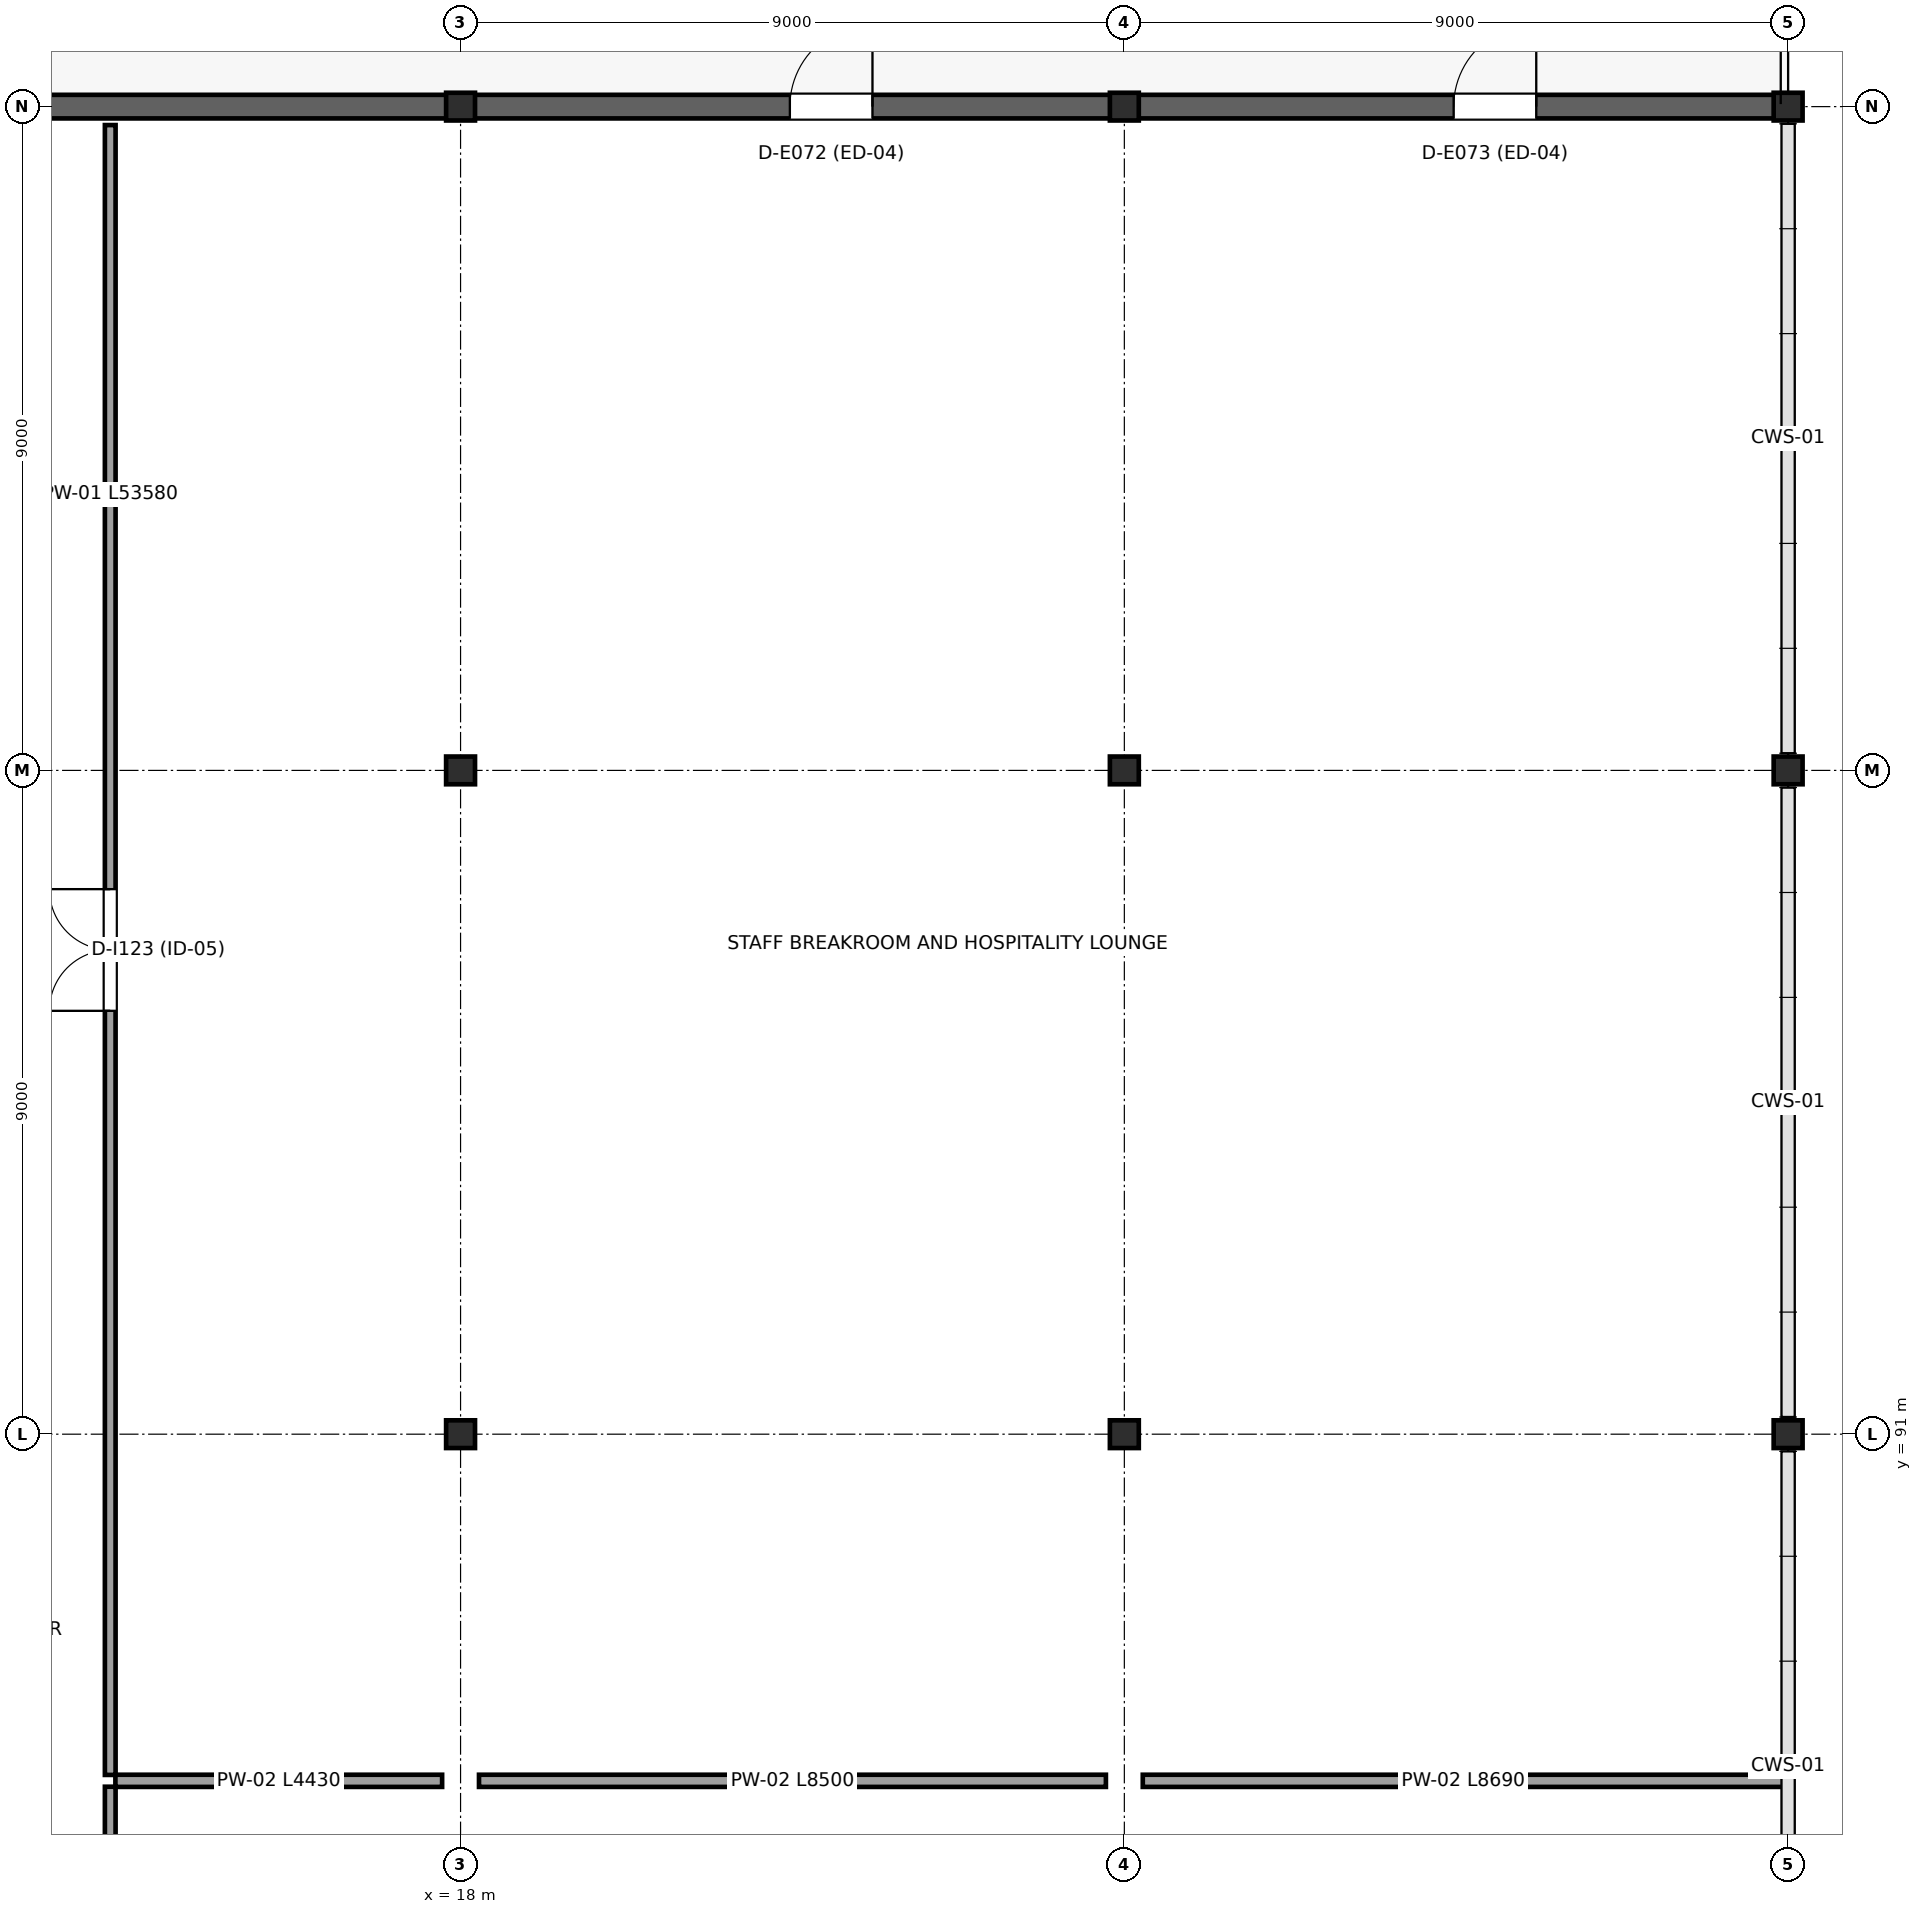
"""IFC4 building model, lengths in metres.
Left out: names, types, materials, properties, quantities, classifications, styles, units other than length and angle.
Written with IfcOpenShell. Run it as: python <this file> out.ifc"""

import sys

from ifc_helpers import new_model, si_unit, direction, frame, frame_2d, origin, origin_2d, place, context, subcontext, project, spatial, rectangle, i_section, extrude, element, fill, save


model = new_model("IFC4")
c1 = context("Model", 3, precision=1e-05, world=origin(), true_north=direction((0.0, 1.0)))
c2 = subcontext(c1, "Body", "Model", "MODEL_VIEW")
j1 = project(units=[si_unit("LENGTHUNIT", "METRE"), si_unit("PLANEANGLEUNIT", "RADIAN")], contexts=[c1])
p1 = place(None, origin())
s1 = spatial("IfcSite", under=j1, at=p1, CompositionType="ELEMENT")
p2 = place(p1, origin())
s2 = spatial("IfcBuilding", under=s1, at=p2, CompositionType="ELEMENT")
p3 = place(p2, frame((0.0, 0.0, 16.5)))
s3 = spatial("IfcBuildingStorey", under=s2, at=p3, CompositionType="ELEMENT", Elevation=16.5)
for number, where, z_axis, x_axis in (
    (1, (18.0, 91.0, 0.0), (0.0, 0.0, 1.0), (1.0, 0.0, 0.0)),
    (2, (18.0, 100.0, 0.0), (0.0, 0.0, 1.0), (1.0, 0.0, 0.0)),
    (3, (18.0, 109.0, 0.0), (0.0, 0.0, 1.0), (1.0, 0.0, 0.0)),
    (4, (27.0, 91.0, 0.0), (0.0, 0.0, 1.0), (1.0, 0.0, 0.0)),
    (5, (27.0, 100.0, 0.0), (0.0, 0.0, 1.0), (1.0, 0.0, 0.0)),
    (6, (27.0, 109.0, 0.0), (0.0, 0.0, 1.0), (1.0, 0.0, 0.0)),
    (7, (36.0, 91.0, 0.0), (0.0, 0.0, 1.0), (1.0, 0.0, 0.0)),
    (8, (36.0, 100.0, 0.0), (0.0, 0.0, 1.0), (1.0, 0.0, 0.0)),
    (9, (36.0, 109.0, 0.0), (0.0, 0.0, 1.0), (1.0, 0.0, 0.0)),
):
    element("IfcColumn", number, at=place(p3, frame(where, z_axis=z_axis, x_axis=x_axis)), inside=s3, PredefinedType="COLUMN", context=c2, shape_type="SweptSolid", body=[
        extrude(i_section(OverallWidth=0.392, OverallDepth=0.376, WebThickness=0.017, FlangeThickness=0.028, at=origin_2d()), origin(), (0.0, 0.0, 1.0), 4.5),
    ])
p4 = place(p3, frame((9.015, 109.0, 0.0), z_axis=(0.0, 0.0, 1.0), x_axis=(1.0, 0.0, 0.0)))
e10 = element("IfcWall", 10, at=p4, inside=s3, PredefinedType="STANDARD", context=c2, shape_type="SweptSolid", body=[
    extrude(rectangle(XDim=8.97, YDim=0.32, at=frame_2d((4.485, 0.0))), origin(), (0.0, 0.0, 1.0), 4.28),
])
p5 = place(p3, frame((18.015, 109.0, 0.0), z_axis=(0.0, 0.0, 1.0), x_axis=(1.0, 0.0, 0.0)))
e11 = element("IfcWall", 11, at=p5, inside=s3, PredefinedType="STANDARD", context=c2, shape_type="SweptSolid", body=[
    extrude(rectangle(XDim=8.97, YDim=0.32, at=frame_2d((4.485, 0.0))), origin(), (0.0, 0.0, 1.0), 4.28),
])
p6 = place(p5, frame((4.45, 0.0, 0.0)))
e12 = element("IfcOpeningElement", 12, at=p6, cuts=e11, PredefinedType="OPENING", context=c2, shape_type="SweptSolid", body=[
    extrude(rectangle(XDim=1.12, YDim=2.24, at=frame_2d((0.56, 1.12))), frame((0.0, 0.17, 0.0), z_axis=(0.0, -1.0, 0.0), x_axis=(1.0, 0.0, 0.0)), (0.0, 0.0, 1.0), 0.34),
])
p7 = place(p3, frame((27.015, 109.0, 0.0), z_axis=(0.0, 0.0, 1.0), x_axis=(1.0, 0.0, 0.0)))
e13 = element("IfcWall", 13, at=p7, inside=s3, PredefinedType="STANDARD", context=c2, shape_type="SweptSolid", body=[
    extrude(rectangle(XDim=8.97, YDim=0.32, at=frame_2d((4.485, 0.0))), origin(), (0.0, 0.0, 1.0), 4.28),
])
p8 = place(p7, frame((4.45, 0.0, 0.0)))
e14 = element("IfcOpeningElement", 14, at=p8, cuts=e13, PredefinedType="OPENING", context=c2, shape_type="SweptSolid", body=[
    extrude(rectangle(XDim=1.12, YDim=2.24, at=frame_2d((0.56, 1.12))), frame((0.0, 0.17, 0.0), z_axis=(0.0, -1.0, 0.0), x_axis=(1.0, 0.0, 0.0)), (0.0, 0.0, 1.0), 0.34),
])
p9 = place(p3, frame((13.25, 73.08, 0.0), z_axis=(0.0, 0.0, 1.0), x_axis=(0.0, 1.0, 0.0)))
e15 = element("IfcWall", 15, at=p9, inside=s3, PredefinedType="PARTITIONING", context=c2, shape_type="SweptSolid", body=[
    extrude(rectangle(XDim=13.14, YDim=0.145, at=frame_2d((6.57, 0.0))), origin(), (0.0, 0.0, 1.0), 3.5),
])
p10 = place(p9, frame((5.93, 0.0, 0.0)))
e16 = element("IfcOpeningElement", 16, at=p10, cuts=e15, PredefinedType="OPENING", context=c2, shape_type="SweptSolid", body=[
    extrude(rectangle(XDim=1.28, YDim=2.34, at=frame_2d((0.64, 1.17))), frame((0.0, 0.083, 0.0), z_axis=(0.0, -1.0, 0.0), x_axis=(1.0, 0.0, 0.0)), (0.0, 0.0, 1.0), 0.165),
])
p11 = place(p3, frame((13.25, 86.38, 0.0), z_axis=(0.0, 0.0, 1.0), x_axis=(0.0, 1.0, 0.0)))
e17 = element("IfcWall", 17, at=p11, inside=s3, PredefinedType="PARTITIONING", context=c2, shape_type="SweptSolid", body=[
    extrude(rectangle(XDim=22.37, YDim=0.145, at=frame_2d((11.185, 0.0))), origin(), (0.0, 0.0, 1.0), 3.5),
])
p12 = place(p11, frame((10.36, 0.0, 0.0)))
e18 = element("IfcOpeningElement", 18, at=p12, cuts=e17, PredefinedType="OPENING", context=c2, shape_type="SweptSolid", body=[
    extrude(rectangle(XDim=1.65, YDim=2.25, at=frame_2d((0.825, 1.125))), frame((0.0, 0.083, 0.0), z_axis=(0.0, -1.0, 0.0), x_axis=(1.0, 0.0, 0.0)), (0.0, 0.0, 1.0), 0.165),
])
p13 = place(p3, frame((13.32, 86.3, 0.0), z_axis=(0.0, 0.0, 1.0), x_axis=(1.0, 0.0, 0.0)))
e19 = element("IfcWall", 19, at=p13, inside=s3, PredefinedType="PARTITIONING", context=c2, shape_type="SweptSolid", body=[
    extrude(rectangle(XDim=4.43, YDim=0.165, at=frame_2d((2.215, 0.0))), origin(), (0.0, 0.0, 1.0), 3.5),
])
p14 = place(p3, frame((18.25, 86.3, 0.0), z_axis=(0.0, 0.0, 1.0), x_axis=(1.0, 0.0, 0.0)))
e20 = element("IfcWall", 20, at=p14, inside=s3, PredefinedType="PARTITIONING", context=c2, shape_type="SweptSolid", body=[
    extrude(rectangle(XDim=8.5, YDim=0.165, at=frame_2d((4.25, 0.0))), origin(), (0.0, 0.0, 1.0), 3.5),
])
p15 = place(p3, frame((27.25, 86.3, 0.0), z_axis=(0.0, 0.0, 1.0), x_axis=(1.0, 0.0, 0.0)))
e21 = element("IfcWall", 21, at=p15, inside=s3, PredefinedType="PARTITIONING", context=c2, shape_type="SweptSolid", body=[
    extrude(rectangle(XDim=8.69, YDim=0.165, at=frame_2d((4.345, 0.0))), origin(), (0.0, 0.0, 1.0), 3.5),
])
p16 = place(p6, origin())
e22 = element("IfcDoor", 22, at=p16, inside=s3, OperationType="SINGLE_SWING_RIGHT", PredefinedType="DOOR", context=c2, shape_type="SweptSolid", body=[
    extrude(rectangle(XDim=1.12, YDim=2.24, at=frame_2d((0.56, 1.12))), frame((0.0, 0.025, 0.0), z_axis=(0.0, -1.0, 0.0), x_axis=(1.0, 0.0, 0.0)), (0.0, 0.0, 1.0), 0.05),
])
fill(e12, e22)
p17 = place(p8, origin())
e23 = element("IfcDoor", 23, at=p17, inside=s3, OperationType="SINGLE_SWING_RIGHT", PredefinedType="DOOR", context=c2, shape_type="SweptSolid", body=[
    extrude(rectangle(XDim=1.12, YDim=2.24, at=frame_2d((0.56, 1.12))), frame((0.0, 0.025, 0.0), z_axis=(0.0, -1.0, 0.0), x_axis=(1.0, 0.0, 0.0)), (0.0, 0.0, 1.0), 0.05),
])
fill(e14, e23)
p18 = place(p12, origin())
e24 = element("IfcDoor", 24, at=p18, inside=s3, OperationType="DOUBLE_DOOR_SINGLE_SWING", PredefinedType="DOOR", context=c2, shape_type="SweptSolid", body=[
    extrude(rectangle(XDim=1.65, YDim=2.25, at=frame_2d((0.825, 1.125))), frame((0.0, 0.025, 0.0), z_axis=(0.0, -1.0, 0.0), x_axis=(1.0, 0.0, 0.0)), (0.0, 0.0, 1.0), 0.05),
])
fill(e18, e24)
save(model, sys.argv[1])
